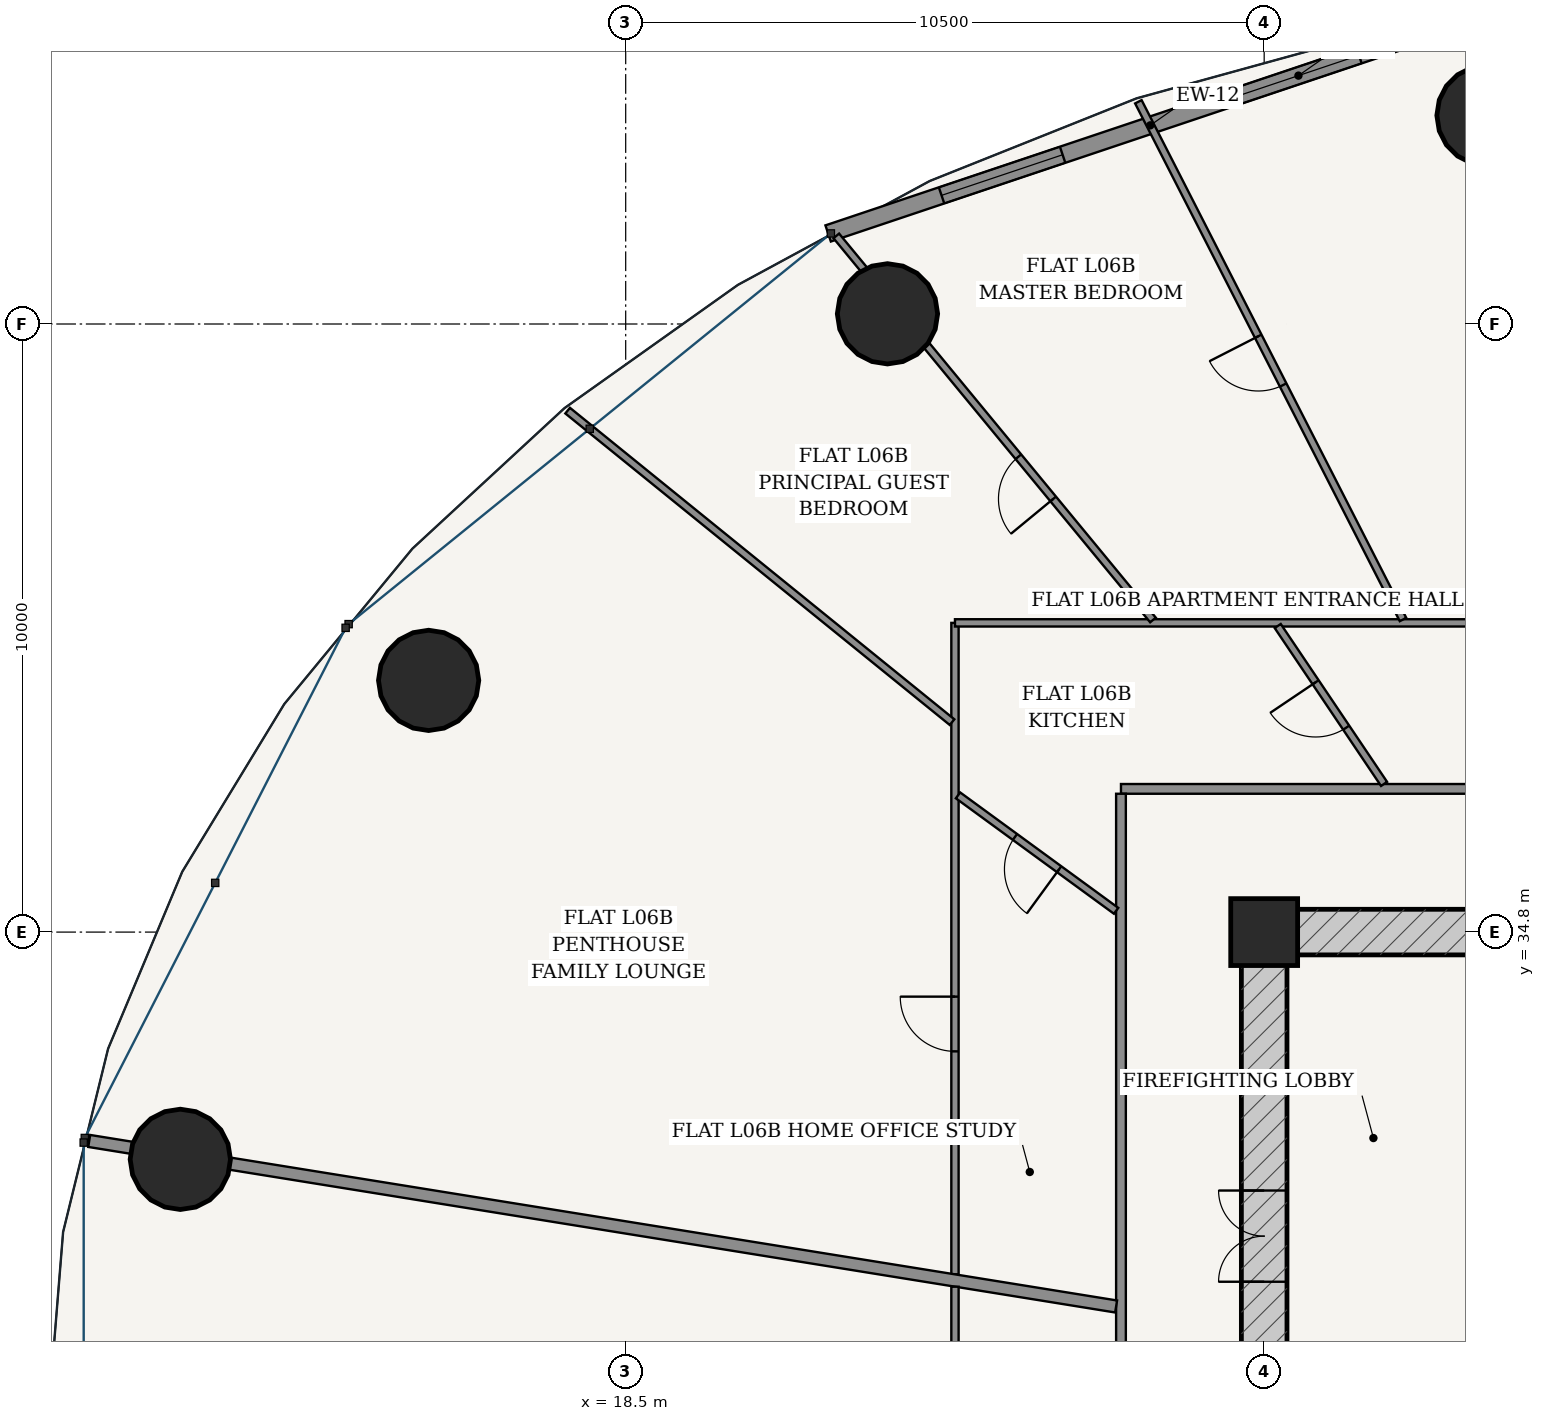
"""IFC4 building model, lengths in metres.
Left out: names, types, materials, properties, quantities, classifications, styles, units other than length and angle.
Written with IfcOpenShell. Run it as: python <this file> out.ifc"""

import sys

from ifc_helpers import new_model, si_unit, direction, frame, frame_2d, origin, origin_2d, place, context, subcontext, project, spatial, rectangle, hollow_circle, extrude, source, transform, mapped, element, fill, save


model = new_model("IFC4")
c1 = context("Model", 3, precision=1e-05, world=origin(), true_north=direction((-0.2419218956, 0.970295726276)))
c2 = subcontext(c1, "Body", "Model", "MODEL_VIEW")
j1 = project(units=[si_unit("LENGTHUNIT", "METRE"), si_unit("PLANEANGLEUNIT", "RADIAN")], contexts=[c1])
p1 = place(None, origin())
s1 = spatial("IfcSite", under=j1, at=p1, CompositionType="ELEMENT")
p2 = place(p1, origin())
s2 = spatial("IfcBuilding", under=s1, at=p2, CompositionType="ELEMENT")
p3 = place(p2, frame((0.0, 0.0, 27.6)))
s3 = spatial("IfcBuildingStorey", under=s2, at=p3, CompositionType="ELEMENT", Elevation=27.6)
p4 = place(p3, frame((29.0, 34.8, 0.0), z_axis=(0.0, 0.0, 1.0), x_axis=(1.0, 0.0, 0.0)))
e1 = element("IfcColumn", 1, at=p4, inside=s3, PredefinedType="COLUMN", context=c2, shape_type="SweptSolid", body=[
    extrude(rectangle(XDim=1.1, YDim=1.1, at=origin_2d()), origin(), (0.0, 0.0, 1.0), 3.6),
])
p5 = place(p3, frame((28.625, 34.8, 0.0), z_axis=(0.0, 0.0, 1.0), x_axis=(1.0, 0.0, 0.0)))
e2 = element("IfcWall", 2, at=p5, inside=s3, PredefinedType="SHEAR", context=c2, shape_type="SweptSolid", body=[
    extrude(rectangle(XDim=18.75, YDim=0.75, at=frame_2d((9.375, 0.0))), origin(), (0.0, 0.0, 1.0), 3.32),
])
p6 = place(p5, frame((8.95, 0.0, 0.0)))
e3 = element("IfcOpeningElement", 3, at=p6, cuts=e2, PredefinedType="OPENING", context=c2, shape_type="SweptSolid", body=[
    extrude(rectangle(XDim=0.85, YDim=2.1, at=frame_2d((0.425, 1.05))), frame((0.0, 0.385, 0.0), z_axis=(0.0, -1.0, 0.0), x_axis=(1.0, 0.0, 0.0)), (0.0, 0.0, 1.0), 0.77),
])
p7 = place(p3, frame((29.0, 19.175, 0.0), z_axis=(0.0, 0.0, 1.0), x_axis=(0.0, 1.0, 0.0)))
e4 = element("IfcWall", 4, at=p7, inside=s3, PredefinedType="SHEAR", context=c2, shape_type="SweptSolid", body=[
    extrude(rectangle(XDim=15.25, YDim=0.75, at=frame_2d((7.625, 0.0))), origin(), (0.0, 0.0, 1.0), 3.32),
])
p8 = place(p7, frame((9.875, 0.0, 0.0)))
e5 = element("IfcOpeningElement", 5, at=p8, cuts=e4, PredefinedType="OPENING", context=c2, shape_type="SweptSolid", body=[
    extrude(rectangle(XDim=1.5, YDim=2.2, at=frame_2d((0.75, 1.1))), frame((0.0, 0.385, 0.0), z_axis=(0.0, -1.0, 0.0), x_axis=(1.0, 0.0, 0.0)), (0.0, 0.0, 1.0), 0.77),
])
for number, where, z_axis, x_axis in (
    (6, (32.664, 48.23, 0.0), (0.0, 0.0, 1.0), (1.0, 0.0, 0.0)),
    (7, (22.805, 44.968, 0.0), (0.0, 0.0, 1.0), (1.0, 0.0, 0.0)),
    (8, (15.259, 38.939, 0.0), (0.0, 0.0, 1.0), (1.0, 0.0, 0.0)),
    (9, (11.176, 31.063, 0.0), (0.0, 0.0, 1.0), (1.0, 0.0, 0.0)),
):
    element("IfcColumn", number, at=place(p3, frame(where, z_axis=z_axis, x_axis=x_axis)), inside=s3, PredefinedType="COLUMN", context=c2, shape_type="SweptSolid", body=[
        extrude(hollow_circle(Radius=0.825, WallThickness=0.05, at=origin_2d()), origin(), (0.0, 0.0, 1.0), 3.6),
    ])
p9 = place(p3, frame((32.424, 49.844, 0.0), z_axis=(0.0, 0.0, 1.0), x_axis=(-0.948041258496, -0.318147406385, 0.0)))
e10 = element("IfcWall", 10, at=p9, inside=s3, PredefinedType="SOLIDWALL", context=c2, shape_type="SweptSolid", body=[
    extrude(rectangle(XDim=11.175, YDim=0.28, at=frame_2d((5.588, 0.0))), origin(), (0.0, 0.0, 1.0), 3.32),
])
p10 = place(p9, frame((1.967, 0.0, 0.85)))
e11 = element("IfcOpeningElement", 11, at=p10, cuts=e10, PredefinedType="OPENING", context=c2, shape_type="SweptSolid", body=[
    extrude(rectangle(XDim=2.1, YDim=1.95, at=frame_2d((1.05, 0.975))), frame((0.0, 0.15, 0.0), z_axis=(0.0, -1.0, 0.0), x_axis=(1.0, 0.0, 0.0)), (0.0, 0.0, 1.0), 0.3),
])
p11 = place(p9, frame((7.108, 0.0, 0.85)))
e12 = element("IfcOpeningElement", 12, at=p11, cuts=e10, PredefinedType="OPENING", context=c2, shape_type="SweptSolid", body=[
    extrude(rectangle(XDim=2.1, YDim=1.95, at=frame_2d((1.05, 0.975))), frame((0.0, 0.15, 0.0), z_axis=(0.0, -1.0, 0.0), x_axis=(1.0, 0.0, 0.0)), (0.0, 0.0, 1.0), 0.3),
])
p12 = place(p3, frame((26.645, 37.155, 0.0), z_axis=(0.0, 0.0, 1.0), x_axis=(1.0, 0.0, 0.0)))
e13 = element("IfcWall", 13, at=p12, inside=s3, PredefinedType="PARTITIONING", context=c2, shape_type="SweptSolid", body=[
    extrude(rectangle(XDim=22.71, YDim=0.16, at=frame_2d((11.355, 0.0))), origin(), (0.0, 0.0, 1.0), 2.688),
])
p13 = place(p12, frame((7.446, 0.0, 0.0)))
e14 = element("IfcOpeningElement", 14, at=p13, cuts=e13, PredefinedType="OPENING", context=c2, shape_type="SweptSolid", body=[
    extrude(rectangle(XDim=0.98, YDim=2.2, at=frame_2d((0.49, 1.1))), frame((0.0, 0.09, 0.0), z_axis=(0.0, -1.0, 0.0), x_axis=(1.0, 0.0, 0.0)), (0.0, 0.0, 1.0), 0.18),
])
p14 = place(p3, frame((26.645, 16.525, 0.0), z_axis=(0.0, 0.0, 1.0), x_axis=(0.0, 1.0, 0.0)))
e15 = element("IfcWall", 15, at=p14, inside=s3, PredefinedType="PARTITIONING", context=c2, shape_type="SweptSolid", body=[
    extrude(rectangle(XDim=20.55, YDim=0.16, at=frame_2d((10.275, 0.0))), origin(), (0.0, 0.0, 1.0), 2.688),
])
p15 = place(p3, frame((23.915, 29.172, 0.0), z_axis=(0.0, 0.0, 1.0), x_axis=(0.0, 1.0, 0.0)))
e16 = element("IfcWall", 16, at=p15, inside=s3, PredefinedType="PARTITIONING", context=c2, shape_type="SweptSolid", body=[
    extrude(rectangle(XDim=10.713, YDim=0.12, at=frame_2d((5.356, 0.0))), origin(), (0.0, 0.0, 1.0), 2.688),
])
p16 = place(p15, frame((3.666, 0.0, 0.0)))
e17 = element("IfcOpeningElement", 17, at=p16, cuts=e16, PredefinedType="OPENING", context=c2, shape_type="SweptSolid", body=[
    extrude(rectangle(XDim=0.9, YDim=2.15, at=frame_2d((0.45, 1.075))), frame((0.0, 0.07, 0.0), z_axis=(0.0, -1.0, 0.0), x_axis=(1.0, 0.0, 0.0)), (0.0, 0.0, 1.0), 0.14),
])
p17 = place(p3, frame((23.915, 39.885, 0.0), z_axis=(0.0, 0.0, 1.0), x_axis=(1.0, 0.0, 0.0)))
e18 = element("IfcWall", 18, at=p17, inside=s3, PredefinedType="PARTITIONING", context=c2, shape_type="SweptSolid", body=[
    extrude(rectangle(XDim=20.671, YDim=0.12, at=frame_2d((10.336, 0.0))), origin(), (0.0, 0.0, 1.0), 2.688),
])
p18 = place(p17, frame((10.444, 0.0, 0.0)))
e19 = element("IfcOpeningElement", 19, at=p18, cuts=e18, PredefinedType="OPENING", context=c2, shape_type="SweptSolid", body=[
    extrude(rectangle(XDim=0.9, YDim=2.15, at=frame_2d((0.45, 1.075))), frame((0.0, 0.07, 0.0), z_axis=(0.0, -1.0, 0.0), x_axis=(1.0, 0.0, 0.0)), (0.0, 0.0, 1.0), 0.14),
])
p19 = place(p3, frame((31.283, 39.94, 0.0), z_axis=(0.0, 0.0, 1.0), x_axis=(-0.455131303234, 0.890424335256, 0.0)))
e20 = element("IfcWall", 20, at=p19, inside=s3, PredefinedType="PARTITIONING", context=c2, shape_type="SweptSolid", body=[
    extrude(rectangle(XDim=9.562, YDim=0.12, at=frame_2d((4.781, 0.0))), origin(), (0.0, 0.0, 1.0), 2.762),
])
p20 = place(p19, frame((4.331, 0.0, 0.0)))
e21 = element("IfcOpeningElement", 21, at=p20, cuts=e20, PredefinedType="OPENING", context=c2, shape_type="SweptSolid", body=[
    extrude(rectangle(XDim=0.9, YDim=2.15, at=frame_2d((0.45, 1.075))), frame((0.0, 0.07, 0.0), z_axis=(0.0, -1.0, 0.0), x_axis=(1.0, 0.0, 0.0)), (0.0, 0.0, 1.0), 0.14),
])
p21 = place(p3, frame((27.171, 39.933, 0.0), z_axis=(0.0, 0.0, 1.0), x_axis=(-0.636192172227, 0.771530634516, 0.0)))
e22 = element("IfcWall", 22, at=p21, inside=s3, PredefinedType="PARTITIONING", context=c2, shape_type="SweptSolid", body=[
    extrude(rectangle(XDim=8.186, YDim=0.12, at=frame_2d((4.093, 0.0))), origin(), (0.0, 0.0, 1.0), 2.688),
])
p22 = place(p21, frame((2.579, 0.0, 0.0)))
e23 = element("IfcOpeningElement", 23, at=p22, cuts=e22, PredefinedType="OPENING", context=c2, shape_type="SweptSolid", body=[
    extrude(rectangle(XDim=0.9, YDim=2.15, at=frame_2d((0.45, 1.075))), frame((0.0, 0.07, 0.0), z_axis=(0.0, -1.0, 0.0), x_axis=(1.0, 0.0, 0.0)), (0.0, 0.0, 1.0), 0.14),
])
p23 = place(p3, frame((23.867, 38.253, 0.0), z_axis=(0.0, 0.0, 1.0), x_axis=(-0.776936623447, 0.629578814087, 0.0)))
e24 = element("IfcWall", 24, at=p23, inside=s3, PredefinedType="PARTITIONING", context=c2, shape_type="SweptSolid", body=[
    extrude(rectangle(XDim=8.136, YDim=0.12, at=frame_2d((4.068, 0.0))), origin(), (0.0, 0.0, 1.0), 2.762),
])
p24 = place(p3, frame((30.972, 37.237, 0.0), z_axis=(0.0, 0.0, 1.0), x_axis=(-0.558563154585, 0.829461995717, 0.0)))
e25 = element("IfcWall", 25, at=p24, inside=s3, PredefinedType="PARTITIONING", context=c2, shape_type="SweptSolid", body=[
    extrude(rectangle(XDim=3.131, YDim=0.12, at=frame_2d((1.565, 0.0))), origin(), (0.0, 0.0, 1.0), 3.32),
])
p25 = place(p24, frame((1.115, 0.0, 0.0)))
e26 = element("IfcOpeningElement", 26, at=p25, cuts=e25, PredefinedType="OPENING", context=c2, shape_type="SweptSolid", body=[
    extrude(rectangle(XDim=0.9, YDim=2.15, at=frame_2d((0.45, 1.075))), frame((0.0, 0.07, 0.0), z_axis=(0.0, -1.0, 0.0), x_axis=(1.0, 0.0, 0.0)), (0.0, 0.0, 1.0), 0.14),
])
p26 = place(p3, frame((26.565, 35.15, 0.0), z_axis=(0.0, 0.0, 1.0), x_axis=(-0.807606444557, 0.589721824855, 0.0)))
e27 = element("IfcWall", 27, at=p26, inside=s3, PredefinedType="PARTITIONING", context=c2, shape_type="SweptSolid", body=[
    extrude(rectangle(XDim=3.219, YDim=0.12, at=frame_2d((1.61, 0.0))), origin(), (0.0, 0.0, 1.0), 3.32),
])
p27 = place(p26, frame((1.16, 0.0, 0.0)))
e28 = element("IfcOpeningElement", 28, at=p27, cuts=e27, PredefinedType="OPENING", context=c2, shape_type="SweptSolid", body=[
    extrude(rectangle(XDim=0.9, YDim=2.15, at=frame_2d((0.45, 1.075))), frame((0.0, 0.07, 0.0), z_axis=(0.0, -1.0, 0.0), x_axis=(1.0, 0.0, 0.0)), (0.0, 0.0, 1.0), 0.14),
])
p28 = place(p3, frame((26.565, 28.643, 0.0), z_axis=(0.0, 0.0, 1.0), x_axis=(-0.987255953651, 0.159140447344, 0.0)))
e29 = element("IfcWall", 29, at=p28, inside=s3, PredefinedType="PARTITIONING", context=c2, shape_type="SweptSolid", body=[
    extrude(rectangle(XDim=17.105, YDim=0.2, at=frame_2d((8.553, 0.0))), origin(), (0.0, 0.0, 1.0), 2.688),
])
p29 = place(p3, frame((23.915, 13.715, 0.0), z_axis=(0.0, 0.0, 1.0), x_axis=(0.0, 1.0, 0.0)))
e30 = element("IfcWall", 30, at=p29, inside=s3, PredefinedType="PARTITIONING", context=c2, shape_type="SweptSolid", body=[
    extrude(rectangle(XDim=15.253, YDim=0.12, at=frame_2d((7.626, 0.0))), origin(), (0.0, 0.0, 1.0), 2.688),
])
p30 = place(p29, frame((7.663, 0.0, 0.0)))
e31 = element("IfcOpeningElement", 31, at=p30, cuts=e30, PredefinedType="OPENING", context=c2, shape_type="SweptSolid", body=[
    extrude(rectangle(XDim=0.9, YDim=2.15, at=frame_2d((0.45, 1.075))), frame((0.0, 0.07, 0.0), z_axis=(0.0, -1.0, 0.0), x_axis=(1.0, 0.0, 0.0)), (0.0, 0.0, 1.0), 0.14),
])
p31 = place(p29, frame((12.803, 0.0, 0.0)))
e32 = element("IfcOpeningElement", 32, at=p31, cuts=e30, PredefinedType="OPENING", context=c2, shape_type="SweptSolid", body=[
    extrude(rectangle(XDim=0.9, YDim=2.15, at=frame_2d((0.45, 1.075))), frame((0.0, 0.07, 0.0), z_axis=(0.0, -1.0, 0.0), x_axis=(1.0, 0.0, 0.0)), (0.0, 0.0, 1.0), 0.14),
])
m1 = source(origin(), c2, "Body", "SweptSolid", [
    extrude(rectangle(XDim=2.1, YDim=1.95, at=frame_2d((1.05, 0.975))), frame((0.0, 0.03, 0.0), z_axis=(0.0, -1.0, 0.0), x_axis=(1.0, 0.0, 0.0)), (0.0, 0.0, 1.0), 0.06),
])
p32 = place(p10, origin())
e33 = element("IfcWindow", 33, at=p32, inside=s3, PartitioningType="SINGLE_PANEL", PredefinedType="WINDOW", context=c2, shape_type="MappedRepresentation", body=[
    mapped(m1, transform((0.0, 0.0, 0.0), scale=1.0)),
])
fill(e11, e33)
p33 = place(p11, origin())
e34 = element("IfcWindow", 34, at=p33, inside=s3, PartitioningType="SINGLE_PANEL", PredefinedType="WINDOW", context=c2, shape_type="MappedRepresentation", body=[
    mapped(m1, transform((0.0, 0.0, 0.0), scale=1.0)),
])
fill(e12, e34)
m2 = source(origin(), c2, "Body", "SweptSolid", [
    extrude(rectangle(XDim=1.5, YDim=2.2, at=frame_2d((0.75, 1.1))), frame((0.0, 0.025, 0.0), z_axis=(0.0, -1.0, 0.0), x_axis=(1.0, 0.0, 0.0)), (0.0, 0.0, 1.0), 0.05),
])
p34 = place(p8, origin())
e35 = element("IfcDoor", 35, at=p34, inside=s3, OperationType="DOUBLE_DOOR_SINGLE_SWING", PredefinedType="DOOR", context=c2, shape_type="MappedRepresentation", body=[
    mapped(m2, transform((0.0, 0.0, 0.0), scale=1.0)),
])
fill(e5, e35)
m3 = source(origin(), c2, "Body", "SweptSolid", [
    extrude(rectangle(XDim=0.9, YDim=2.15, at=frame_2d((0.45, 1.075))), frame((0.0, 0.025, 0.0), z_axis=(0.0, -1.0, 0.0), x_axis=(1.0, 0.0, 0.0)), (0.0, 0.0, 1.0), 0.05),
])
p35 = place(p25, origin())
e36 = element("IfcDoor", 36, at=p35, inside=s3, OperationType="SINGLE_SWING_RIGHT", PredefinedType="DOOR", context=c2, shape_type="MappedRepresentation", body=[
    mapped(m3, transform((0.0, 0.0, 0.0), scale=1.0)),
])
fill(e26, e36)
p36 = place(p27, origin())
e37 = element("IfcDoor", 37, at=p36, inside=s3, OperationType="SINGLE_SWING_LEFT", PredefinedType="DOOR", context=c2, shape_type="MappedRepresentation", body=[
    mapped(m3, transform((0.0, 0.0, 0.0), scale=1.0)),
])
fill(e28, e37)
p37 = place(p20, origin())
e38 = element("IfcDoor", 38, at=p37, inside=s3, OperationType="SINGLE_SWING_RIGHT", PredefinedType="DOOR", context=c2, shape_type="MappedRepresentation", body=[
    mapped(m3, transform((0.0, 0.0, 0.0), scale=1.0)),
])
fill(e21, e38)
p38 = place(p22, origin())
e39 = element("IfcDoor", 39, at=p38, inside=s3, OperationType="SINGLE_SWING_LEFT", PredefinedType="DOOR", context=c2, shape_type="MappedRepresentation", body=[
    mapped(m3, transform((0.0, 0.0, 0.0), scale=1.0)),
])
fill(e23, e39)
p39 = place(p16, origin())
e40 = element("IfcDoor", 40, at=p39, inside=s3, OperationType="SINGLE_SWING_RIGHT", PredefinedType="DOOR", context=c2, shape_type="MappedRepresentation", body=[
    mapped(m3, transform((0.0, 0.0, 0.0), scale=1.0)),
])
fill(e17, e40)
save(model, sys.argv[1])
